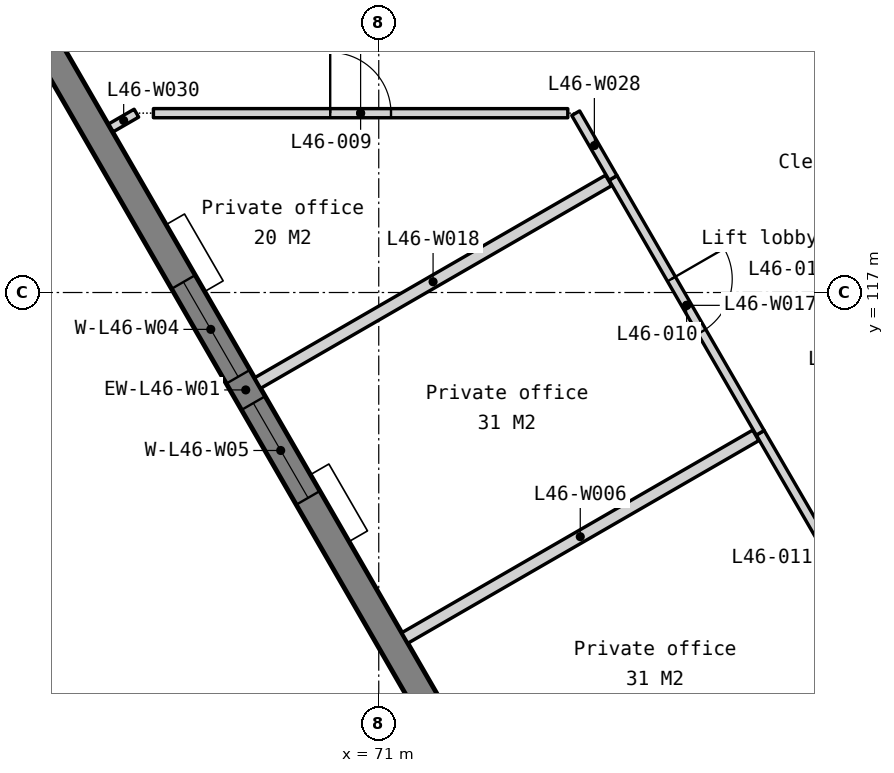
"""IFC4 building model, lengths in metres.
Left out: names, types, materials, properties, quantities, classifications, styles, units other than length and angle.
Written with IfcOpenShell. Run it as: python <this file> out.ifc"""

import sys

from ifc_helpers import new_model, si_unit, direction, frame, frame_2d, origin, place, context, subcontext, project, spatial, polyline, rectangle, outline, extrude, element, fill, save


model = new_model("IFC4")
c1 = context("Model", 3, precision=1e-05, world=origin(), true_north=direction((0.0, 1.0)))
c2 = subcontext(c1, "Body", "Model", "MODEL_VIEW")
j1 = project(units=[si_unit("LENGTHUNIT", "METRE"), si_unit("PLANEANGLEUNIT", "RADIAN")], contexts=[c1])
p1 = place(None, origin())
s1 = spatial("IfcSite", under=j1, at=p1, CompositionType="ELEMENT")
p2 = place(p1, origin())
s2 = spatial("IfcBuilding", under=s1, at=p2, CompositionType="ELEMENT")
p3 = place(p2, frame((0.0, 0.0, 184.1)))
s3 = spatial("IfcBuildingStorey", under=s2, at=p3, CompositionType="ELEMENT", Elevation=184.1)
p4 = place(p3, frame((59.13, 132.168, -0.15), z_axis=(0.0, 0.0, 1.0), x_axis=(0.500002199942, -0.866024133644, 0.0)))
e1 = element("IfcWall", 1, at=p4, inside=s3, PredefinedType="SOLIDWALL", context=c2, shape_type="SweptSolid", body=[
    extrude(outline(polyline([(38.729, 0.0), (38.729, 3.9), (0.0, 3.9), (0.0, 0.0), (38.729, 0.0)])), frame((0.0, 0.225, 0.0), z_axis=(0.0, -1.0, 0.0), x_axis=(1.0, 0.0, 0.0)), (0.0, 0.0, 1.0), 0.45),
])
p5 = place(p4, frame((0.776, 0.0, 0.95)))
e2 = element("IfcOpeningElement", 2, at=p5, cuts=e1, PredefinedType="OPENING", context=c2, shape_type="SweptSolid", body=[
    extrude(rectangle(XDim=1.2, YDim=2.2, at=frame_2d((0.6, 1.1))), frame((0.0, 0.235, 0.0), z_axis=(0.0, -1.0, 0.0), x_axis=(1.0, 0.0, 0.0)), (0.0, 0.0, 1.0), 0.47),
])
p6 = place(p4, frame((7.632, 0.0, 0.95)))
e3 = element("IfcOpeningElement", 3, at=p6, cuts=e1, PredefinedType="OPENING", context=c2, shape_type="SweptSolid", body=[
    extrude(rectangle(XDim=1.8, YDim=2.2, at=frame_2d((0.9, 1.1))), frame((0.0, 0.235, 0.0), z_axis=(0.0, -1.0, 0.0), x_axis=(1.0, 0.0, 0.0)), (0.0, 0.0, 1.0), 0.47),
])
p7 = place(p4, frame((9.932, 0.0, 0.95)))
e4 = element("IfcOpeningElement", 4, at=p7, cuts=e1, PredefinedType="OPENING", context=c2, shape_type="SweptSolid", body=[
    extrude(rectangle(XDim=1.8, YDim=2.2, at=frame_2d((0.9, 1.1))), frame((0.0, 0.235, 0.0), z_axis=(0.0, -1.0, 0.0), x_axis=(1.0, 0.0, 0.0)), (0.0, 0.0, 1.0), 0.47),
])
p8 = place(p4, frame((17.315, 0.0, 0.95)))
e5 = element("IfcOpeningElement", 5, at=p8, cuts=e1, PredefinedType="OPENING", context=c2, shape_type="SweptSolid", body=[
    extrude(rectangle(XDim=1.8, YDim=2.2, at=frame_2d((0.9, 1.1))), frame((0.0, 0.235, 0.0), z_axis=(0.0, -1.0, 0.0), x_axis=(1.0, 0.0, 0.0)), (0.0, 0.0, 1.0), 0.47),
])
p9 = place(p4, frame((19.615, 0.0, 0.95)))
e6 = element("IfcOpeningElement", 6, at=p9, cuts=e1, PredefinedType="OPENING", context=c2, shape_type="SweptSolid", body=[
    extrude(rectangle(XDim=1.8, YDim=2.2, at=frame_2d((0.9, 1.1))), frame((0.0, 0.235, 0.0), z_axis=(0.0, -1.0, 0.0), x_axis=(1.0, 0.0, 0.0)), (0.0, 0.0, 1.0), 0.47),
])
p10 = place(p4, frame((26.997, 0.0, 0.95)))
e7 = element("IfcOpeningElement", 7, at=p10, cuts=e1, PredefinedType="OPENING", context=c2, shape_type="SweptSolid", body=[
    extrude(rectangle(XDim=1.8, YDim=2.2, at=frame_2d((0.9, 1.1))), frame((0.0, 0.235, 0.0), z_axis=(0.0, -1.0, 0.0), x_axis=(1.0, 0.0, 0.0)), (0.0, 0.0, 1.0), 0.47),
])
p11 = place(p4, frame((29.297, 0.0, 0.95)))
e8 = element("IfcOpeningElement", 8, at=p11, cuts=e1, PredefinedType="OPENING", context=c2, shape_type="SweptSolid", body=[
    extrude(rectangle(XDim=1.8, YDim=2.2, at=frame_2d((0.9, 1.1))), frame((0.0, 0.235, 0.0), z_axis=(0.0, -1.0, 0.0), x_axis=(1.0, 0.0, 0.0)), (0.0, 0.0, 1.0), 0.47),
])
p12 = place(p4, frame((36.753, 0.0, 0.95)))
e9 = element("IfcOpeningElement", 9, at=p12, cuts=e1, PredefinedType="OPENING", context=c2, shape_type="SweptSolid", body=[
    extrude(rectangle(XDim=1.2, YDim=2.2, at=frame_2d((0.6, 1.1))), frame((0.0, 0.235, 0.0), z_axis=(0.0, -1.0, 0.0), x_axis=(1.0, 0.0, 0.0)), (0.0, 0.0, 1.0), 0.47),
])
p13 = place(p3, frame((73.849, 107.125, 0.0), z_axis=(0.0, 0.0, 1.0), x_axis=(0.866029815523, 0.499992358568, 0.0)))
e10 = element("IfcWall", 10, at=p13, inside=s3, PredefinedType="PARTITIONING", context=c2, shape_type="SweptSolid", body=[
    extrude(rectangle(XDim=6.76, YDim=0.1, at=frame_2d((3.38, 0.0))), origin(), (0.0, 0.0, 1.0), 3.75),
])
p14 = place(p13, frame((2.93, 0.0, 0.0)))
e11 = element("IfcOpeningElement", 11, at=p14, cuts=e10, PredefinedType="OPENING", context=c2, shape_type="SweptSolid", body=[
    extrude(rectangle(XDim=0.9, YDim=2.1, at=frame_2d((0.45, 1.05))), frame((0.0, 0.06, 0.0), z_axis=(0.0, -1.0, 0.0), x_axis=(1.0, 0.0, 0.0)), (0.0, 0.0, 1.0), 0.12),
])
p15 = place(p3, frame((77.274, 114.693, 0.0), z_axis=(0.0, 0.0, 1.0), x_axis=(0.501799348286, -0.864984054223, 0.0)))
e12 = element("IfcWall", 12, at=p15, inside=s3, PredefinedType="PARTITIONING", context=c2, shape_type="SweptSolid", body=[
    extrude(rectangle(XDim=4.766, YDim=0.15, at=frame_2d((2.383, 0.0))), origin(), (0.0, 0.0, 1.0), 3.75),
])
p16 = place(p15, frame((1.883, 0.0, 0.0)))
e13 = element("IfcOpeningElement", 13, at=p16, cuts=e12, PredefinedType="OPENING", context=c2, shape_type="SweptSolid", body=[
    extrude(rectangle(XDim=1.0, YDim=2.1, at=frame_2d((0.5, 1.05))), frame((0.0, 0.085, 0.0), z_axis=(0.0, -1.0, 0.0), x_axis=(1.0, 0.0, 0.0)), (0.0, 0.0, 1.0), 0.17),
])
p17 = place(p3, frame((71.428, 111.318, 0.0), z_axis=(0.0, 0.0, 1.0), x_axis=(0.866020884234, 0.500007828009, 0.0)))
e14 = element("IfcWall", 14, at=p17, inside=s3, PredefinedType="PARTITIONING", context=c2, shape_type="SweptSolid", body=[
    extrude(rectangle(XDim=6.665, YDim=0.2, at=frame_2d((3.333, 0.0))), origin(), (0.0, 0.0, 1.0), 3.75),
])
p18 = place(p3, frame((74.853, 118.885, 0.0), z_axis=(0.0, 0.0, 1.0), x_axis=(0.500006196252, -0.866021826347, 0.0)))
e15 = element("IfcWall", 15, at=p18, inside=s3, PredefinedType="PARTITIONING", context=c2, shape_type="SweptSolid", body=[
    extrude(rectangle(XDim=4.841, YDim=0.15, at=frame_2d((2.421, 0.0))), origin(), (0.0, 0.0, 1.0), 3.75),
])
p19 = place(p18, frame((1.921, 0.0, 0.0)))
e16 = element("IfcOpeningElement", 16, at=p19, cuts=e15, PredefinedType="OPENING", context=c2, shape_type="SweptSolid", body=[
    extrude(rectangle(XDim=1.0, YDim=2.1, at=frame_2d((0.5, 1.05))), frame((0.0, 0.085, 0.0), z_axis=(0.0, -1.0, 0.0), x_axis=(1.0, 0.0, 0.0)), (0.0, 0.0, 1.0), 0.17),
])
p20 = place(p3, frame((69.007, 115.51, 0.0), z_axis=(0.0, 0.0, 1.0), x_axis=(0.866030041738, 0.499991966744, 0.0)))
e17 = element("IfcWall", 17, at=p20, inside=s3, PredefinedType="PARTITIONING", context=c2, shape_type="SweptSolid", body=[
    extrude(rectangle(XDim=6.665, YDim=0.2, at=frame_2d((3.333, 0.0))), origin(), (0.0, 0.0, 1.0), 3.75),
])
p21 = place(p3, frame((74.239, 119.949, 0.0), z_axis=(0.0, 0.0, 1.0), x_axis=(0.499923202248, -0.866069738447, 0.0)))
e18 = element("IfcWall", 18, at=p21, inside=s3, PredefinedType="PARTITIONING", context=c2, shape_type="SweptSolid", body=[
    extrude(rectangle(XDim=1.228, YDim=0.15, at=frame_2d((0.614, 0.0))), origin(), (0.0, 0.0, 1.0), 3.75),
])
p22 = place(p3, frame((66.595, 119.708, 0.0), z_axis=(0.0, 0.0, 1.0), x_axis=(0.865967067452, 0.500101027882, 0.0)))
e19 = element("IfcWall", 19, at=p22, inside=s3, PredefinedType="PARTITIONING", context=c2, shape_type="SweptSolid", body=[
    extrude(rectangle(XDim=0.484, YDim=0.15, at=frame_2d((0.242, 0.0))), origin(), (0.0, 0.0, 1.0), 3.75),
])
p23 = place(p3, frame((67.294, 119.95, 0.0), z_axis=(0.0, 0.0, 1.0), x_axis=(0.999999994225, -0.000107472952, 0.0)))
e20 = element("IfcWall", 20, at=p23, inside=s3, PredefinedType="PARTITIONING", context=c2, shape_type="SweptSolid", body=[
    extrude(rectangle(XDim=6.815, YDim=0.15, at=frame_2d((3.407, 0.0))), origin(), (0.0, 0.0, 1.0), 3.75),
])
p24 = place(p23, frame((2.907, 0.0, 0.0)))
e21 = element("IfcOpeningElement", 21, at=p24, cuts=e20, PredefinedType="OPENING", context=c2, shape_type="SweptSolid", body=[
    extrude(rectangle(XDim=1.0, YDim=2.1, at=frame_2d((0.5, 1.05))), frame((0.0, 0.085, 0.0), z_axis=(0.0, -1.0, 0.0), x_axis=(1.0, 0.0, 0.0)), (0.0, 0.0, 1.0), 0.17),
])
p25 = place(p8, origin())
e22 = element("IfcWindow", 22, at=p25, inside=s3, PartitioningType="SINGLE_PANEL", PredefinedType="WINDOW", context=c2, shape_type="SweptSolid", body=[
    extrude(rectangle(XDim=1.8, YDim=2.2, at=frame_2d((0.9, 1.1))), frame((0.0, 0.03, 0.0), z_axis=(0.0, -1.0, 0.0), x_axis=(1.0, 0.0, 0.0)), (0.0, 0.0, 1.0), 0.06),
])
fill(e5, e22)
p26 = place(p9, origin())
e23 = element("IfcWindow", 23, at=p26, inside=s3, PartitioningType="SINGLE_PANEL", PredefinedType="WINDOW", context=c2, shape_type="SweptSolid", body=[
    extrude(rectangle(XDim=1.8, YDim=2.2, at=frame_2d((0.9, 1.1))), frame((0.0, 0.03, 0.0), z_axis=(0.0, -1.0, 0.0), x_axis=(1.0, 0.0, 0.0)), (0.0, 0.0, 1.0), 0.06),
])
fill(e6, e23)
p27 = place(p24, origin())
e24 = element("IfcDoor", 24, at=p27, inside=s3, OperationType="SINGLE_SWING_LEFT", PredefinedType="DOOR", context=c2, shape_type="SweptSolid", body=[
    extrude(rectangle(XDim=1.0, YDim=2.1, at=frame_2d((0.5, 1.05))), frame((0.0, 0.025, 0.0), z_axis=(0.0, -1.0, 0.0), x_axis=(1.0, 0.0, 0.0)), (0.0, 0.0, 1.0), 0.05),
])
fill(e21, e24)
p28 = place(p19, origin())
e25 = element("IfcDoor", 25, at=p28, inside=s3, OperationType="SINGLE_SWING_LEFT", PredefinedType="DOOR", context=c2, shape_type="SweptSolid", body=[
    extrude(rectangle(XDim=1.0, YDim=2.1, at=frame_2d((0.5, 1.05))), frame((0.0, 0.025, 0.0), z_axis=(0.0, -1.0, 0.0), x_axis=(1.0, 0.0, 0.0)), (0.0, 0.0, 1.0), 0.05),
])
fill(e16, e25)
save(model, sys.argv[1])
